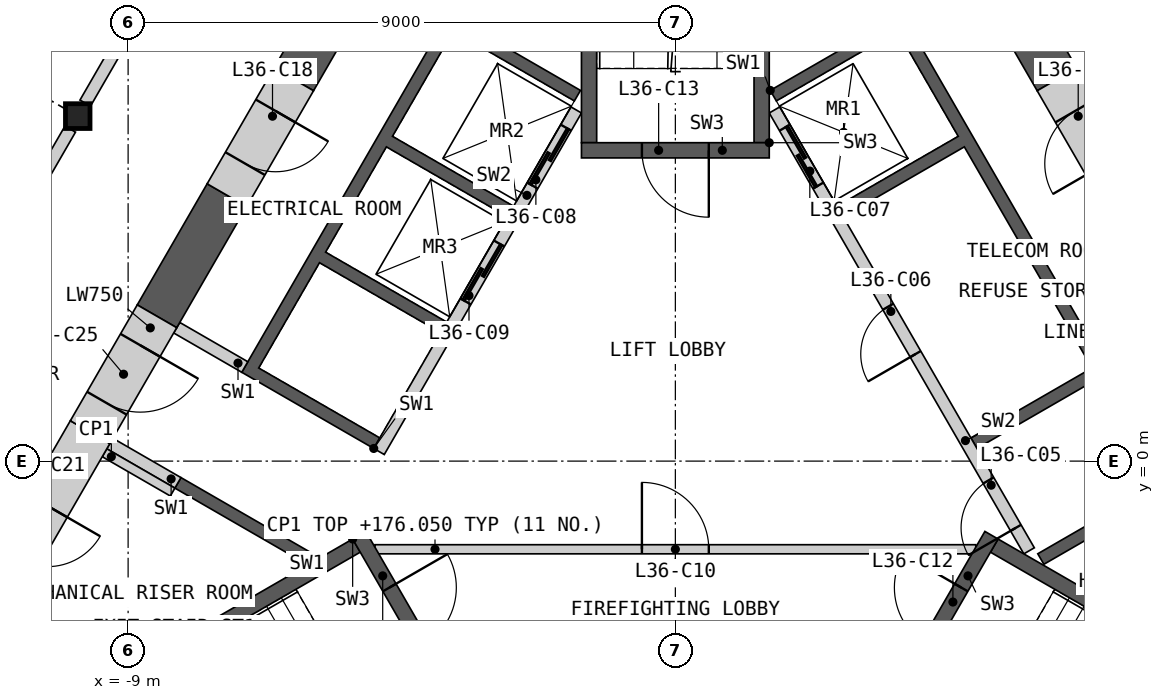
"""IFC4 building model, lengths in metres.
Left out: names, types, materials, properties, quantities, classifications, styles, units other than length and angle.
Written with IfcOpenShell. Run it as: python <this file> out.ifc"""

import sys

from ifc_helpers import new_model, si_unit, direction, frame, frame_2d, origin, origin_2d, place, context, subcontext, project, spatial, polyline, rectangle, i_section, outline, extrude, element, fill, save


model = new_model("IFC4")
c1 = context("Model", 3, precision=1e-05, world=origin(), true_north=direction((0.0, 1.0)))
c2 = subcontext(c1, "Body", "Model", "MODEL_VIEW")
j1 = project(units=[si_unit("LENGTHUNIT", "METRE"), si_unit("PLANEANGLEUNIT", "RADIAN")], contexts=[c1])
p1 = place(None, origin())
s1 = spatial("IfcSite", under=j1, at=p1, CompositionType="ELEMENT")
p2 = place(p1, origin())
s2 = spatial("IfcBuilding", under=s1, at=p2, CompositionType="ELEMENT")
p3 = place(p2, frame((0.0, 0.0, 172.8)))
s3 = spatial("IfcBuildingStorey", under=s2, at=p3, CompositionType="ELEMENT", Elevation=172.8)
p4 = place(p3, frame((-9.828, 5.675, 0.0), z_axis=(0.0, 0.0, 1.0), x_axis=(1.0, 0.0, 0.0)))
e1 = element("IfcColumn", 1, at=p4, inside=s3, PredefinedType="COLUMN", context=c2, shape_type="SweptSolid", body=[
    extrude(i_section(OverallWidth=0.404, OverallDepth=0.407, WebThickness=0.027, FlangeThickness=0.044, at=origin_2d()), origin(), (0.0, 0.0, 1.0), 3.6),
])
p5 = place(p3, origin())
e2 = element("IfcWall", 2, at=p5, inside=s3, PredefinedType="SHEAR", context=c2, shape_type="SweptSolid", body=[
    extrude(outline(polyline([(1.561, 6.097), (3.731, 7.35), (7.131, 1.461), (4.96, 0.208), (4.861, 0.381), (6.852, 1.531), (4.752, 5.169), (2.76, 4.019), (2.66, 4.192), (4.652, 5.342), (3.652, 7.074), (1.66, 5.924), (1.561, 6.097)])), origin(), (0.0, 0.0, 1.0), 3.25),
])
p6 = place(p3, origin())
e3 = element("IfcWall", 3, at=p6, inside=s3, PredefinedType="SHEAR", context=c2, shape_type="SweptSolid", body=[
    extrude(outline(polyline([(8.231, -0.444), (6.061, -1.697), (5.96, -1.524), (8.131, -0.271), (8.231, -0.444)])), origin(), (0.0, 0.0, 1.0), 3.25),
])
p7 = place(p3, frame((5.817, -1.476, 0.0), z_axis=(0.0, 0.0, 1.0), x_axis=(-0.500002616675, 0.866023893041, 0.0)))
e4 = element("IfcWall", 4, at=p7, inside=s3, PredefinedType="SOLIDWALL", context=c2, shape_type="SweptSolid", body=[
    extrude(rectangle(XDim=8.373, YDim=0.2, at=frame_2d((4.187, 0.0))), origin(), (0.0, 0.0, 1.0), 3.25),
])
p8 = place(p7, frame((0.437, 0.0, 0.0)))
e5 = element("IfcOpeningElement", 5, at=p8, cuts=e4, PredefinedType="OPENING", context=c2, shape_type="SweptSolid", body=[
    extrude(rectangle(XDim=0.9, YDim=2.1, at=frame_2d((0.45, 1.05))), frame((0.0, 0.11, 0.0), z_axis=(0.0, -1.0, 0.0), x_axis=(1.0, 0.0, 0.0)), (0.0, 0.0, 1.0), 0.22),
])
p9 = place(p7, frame((3.737, 0.0, 0.0)))
e6 = element("IfcOpeningElement", 6, at=p9, cuts=e4, PredefinedType="OPENING", context=c2, shape_type="SweptSolid", body=[
    extrude(rectangle(XDim=0.9, YDim=2.1, at=frame_2d((0.45, 1.05))), frame((0.0, 0.11, 0.0), z_axis=(0.0, -1.0, 0.0), x_axis=(1.0, 0.0, 0.0)), (0.0, 0.0, 1.0), 0.22),
])
p10 = place(p7, frame((6.937, 0.0, 0.0)))
e7 = element("IfcOpeningElement", 7, at=p10, cuts=e4, PredefinedType="OPENING", context=c2, shape_type="SweptSolid", body=[
    extrude(rectangle(XDim=1.1, YDim=2.1, at=frame_2d((0.55, 1.05))), frame((0.0, 0.11, 0.0), z_axis=(0.0, -1.0, 0.0), x_axis=(1.0, 0.0, 0.0)), (0.0, 0.0, 1.0), 0.22),
])
p11 = place(p3, origin())
e8 = element("IfcWall", 8, at=p11, inside=s3, PredefinedType="SHEAR", context=c2, shape_type="SweptSolid", body=[
    extrude(outline(polyline([(-6.061, -1.697), (-8.231, -0.444), (-8.131, -0.271), (-5.96, -1.524), (-6.061, -1.697)])), origin(), (0.0, 0.0, 1.0), 3.25),
])
p12 = place(p3, origin())
e9 = element("IfcWall", 9, at=p12, inside=s3, PredefinedType="SHEAR", context=c2, shape_type="SweptSolid", body=[
    extrude(outline(polyline([(-4.96, 0.208), (-7.131, 1.461), (-3.731, 7.35), (-1.561, 6.097), (-1.66, 5.924), (-3.652, 7.074), (-4.652, 5.342), (-2.66, 4.192), (-2.76, 4.019), (-4.752, 5.169), (-5.752, 3.437), (-3.76, 2.287), (-3.861, 2.113), (-5.852, 3.263), (-6.852, 1.531), (-4.861, 0.381), (-4.96, 0.208)])), origin(), (0.0, 0.0, 1.0), 3.25),
])
p13 = place(p3, frame((-1.631, 5.776, 0.0), z_axis=(0.0, 0.0, 1.0), x_axis=(-0.499992876559, -0.866029516466, 0.0)))
e10 = element("IfcWall", 10, at=p13, inside=s3, PredefinedType="SOLIDWALL", context=c2, shape_type="SweptSolid", body=[
    extrude(rectangle(XDim=6.486, YDim=0.2, at=frame_2d((3.243, 0.0))), origin(), (0.0, 0.0, 1.0), 3.25),
])
p14 = place(p13, frame((0.337, 0.0, 0.0)))
e11 = element("IfcOpeningElement", 11, at=p14, cuts=e10, PredefinedType="OPENING", context=c2, shape_type="SweptSolid", body=[
    extrude(rectangle(XDim=1.1, YDim=2.1, at=frame_2d((0.55, 1.05))), frame((0.0, 0.11, 0.0), z_axis=(0.0, -1.0, 0.0), x_axis=(1.0, 0.0, 0.0)), (0.0, 0.0, 1.0), 0.22),
])
p15 = place(p13, frame((2.537, 0.0, 0.0)))
e12 = element("IfcOpeningElement", 12, at=p15, cuts=e10, PredefinedType="OPENING", context=c2, shape_type="SweptSolid", body=[
    extrude(rectangle(XDim=1.1, YDim=2.1, at=frame_2d((0.55, 1.05))), frame((0.0, 0.11, 0.0), z_axis=(0.0, -1.0, 0.0), x_axis=(1.0, 0.0, 0.0)), (0.0, 0.0, 1.0), 0.22),
])
for number, where, z_axis, x_axis in (
    (13, (-7.081, 1.548, 0.0), (0.0, 0.0, 1.0), (-0.866, 0.5, 0.0)),
    (14, (-8.181, -0.357, 0.0), (0.0, 0.0, 1.0), (-0.866, 0.5, 0.0)),
):
    element("IfcWall", number, at=place(p3, frame(where, z_axis=z_axis, x_axis=x_axis)), inside=s3, PredefinedType="SHEAR", context=c2, shape_type="SweptSolid", body=[
        extrude(rectangle(XDim=1.293, YDim=0.2, at=frame_2d((0.646, 0.0))), origin(), (0.0, 0.0, 1.0), 3.25),
    ])
p16 = place(p3, frame((-4.941, -1.45, 0.0), z_axis=(0.0, 0.0, 1.0), x_axis=(1.0, 0.0, 0.0)))
e15 = element("IfcWall", 15, at=p16, inside=s3, PredefinedType="PARTITIONING", context=c2, shape_type="SweptSolid", body=[
    extrude(rectangle(XDim=9.882, YDim=0.15, at=frame_2d((4.941, 0.0))), origin(), (0.0, 0.0, 1.0), 3.25),
])
p17 = place(p16, frame((4.391, 0.0, 0.0)))
e16 = element("IfcOpeningElement", 16, at=p17, cuts=e15, PredefinedType="OPENING", context=c2, shape_type="SweptSolid", body=[
    extrude(rectangle(XDim=1.1, YDim=2.1, at=frame_2d((0.55, 1.05))), frame((0.0, 0.085, 0.0), z_axis=(0.0, -1.0, 0.0), x_axis=(1.0, 0.0, 0.0)), (0.0, 0.0, 1.0), 0.17),
])
p18 = place(p3, origin())
e17 = element("IfcWall", 17, at=p18, inside=s3, PredefinedType="SHEAR", context=c2, shape_type="SweptSolid", body=[
    extrude(outline(polyline([(-5.307, -1.281), (-10.374, -4.206), (-10.032, -4.298), (-5.182, -1.498), (-5.307, -1.281)])), origin(), (0.0, 0.0, 1.0), 3.25),
])
p19 = place(p3, frame((-5.199, -1.219, 0.0), z_axis=(0.0, 0.0, 1.0), x_axis=(0.499982516597, -0.866035497597, 0.0)))
e18 = element("IfcWall", 18, at=p19, inside=s3, PredefinedType="SHEAR", context=c2, shape_type="SweptSolid", body=[
    extrude(rectangle(XDim=3.088, YDim=0.25, at=frame_2d((1.544, 0.0))), origin(), (0.0, 0.0, 1.0), 3.25),
])
p20 = place(p19, frame((0.994, 0.0, 0.0)))
e19 = element("IfcOpeningElement", 19, at=p20, cuts=e18, PredefinedType="OPENING", context=c2, shape_type="SweptSolid", body=[
    extrude(rectangle(XDim=1.1, YDim=2.1, at=frame_2d((0.55, 1.05))), frame((0.0, 0.135, 0.0), z_axis=(0.0, -1.0, 0.0), x_axis=(1.0, 0.0, 0.0)), (0.0, 0.0, 1.0), 0.27),
])
p21 = place(p3, origin())
e20 = element("IfcWall", 20, at=p21, inside=s3, PredefinedType="SHEAR", context=c2, shape_type="SweptSolid", body=[
    extrude(outline(polyline([(10.032, -4.298), (10.374, -4.206), (5.307, -1.281), (5.182, -1.498), (10.032, -4.298)])), origin(), (0.0, 0.0, 1.0), 3.25),
])
p22 = place(p3, frame((3.655, -3.893, 0.0), z_axis=(0.0, 0.0, 1.0), x_axis=(0.499982516597, 0.866035497597, 0.0)))
e21 = element("IfcWall", 21, at=p22, inside=s3, PredefinedType="SHEAR", context=c2, shape_type="SweptSolid", body=[
    extrude(rectangle(XDim=3.088, YDim=0.25, at=frame_2d((1.544, 0.0))), origin(), (0.0, 0.0, 1.0), 3.25),
])
p23 = place(p22, frame((0.994, 0.0, 0.0)))
e22 = element("IfcOpeningElement", 22, at=p23, cuts=e21, PredefinedType="OPENING", context=c2, shape_type="SweptSolid", body=[
    extrude(rectangle(XDim=1.1, YDim=2.1, at=frame_2d((0.55, 1.05))), frame((0.0, 0.135, 0.0), z_axis=(0.0, -1.0, 0.0), x_axis=(1.0, 0.0, 0.0)), (0.0, 0.0, 1.0), 0.27),
])
p24 = place(p3, origin())
e23 = element("IfcWall", 23, at=p24, inside=s3, PredefinedType="SHEAR", context=c2, shape_type="SweptSolid", body=[
    extrude(outline(polyline([(1.544, 5.237), (1.544, 11.087), (1.294, 10.837), (1.294, 5.237), (1.544, 5.237)])), origin(), (0.0, 0.0, 1.0), 3.25),
])
p25 = place(p3, origin())
e24 = element("IfcWall", 24, at=p25, inside=s3, PredefinedType="SHEAR", context=c2, shape_type="SweptSolid", body=[
    extrude(outline(polyline([(-1.294, 10.837), (-1.544, 11.087), (-1.544, 5.237), (-1.294, 5.237), (-1.294, 10.837)])), origin(), (0.0, 0.0, 1.0), 3.25),
])
p26 = place(p3, frame((1.544, 5.112, 0.0), z_axis=(0.0, 0.0, 1.0), x_axis=(-1.0, 0.0, 0.0)))
e25 = element("IfcWall", 25, at=p26, inside=s3, PredefinedType="SHEAR", context=c2, shape_type="SweptSolid", body=[
    extrude(rectangle(XDim=3.088, YDim=0.25, at=frame_2d((1.544, 0.0))), origin(), (0.0, 0.0, 1.0), 3.25),
])
p27 = place(p26, frame((0.994, 0.0, 0.0)))
e26 = element("IfcOpeningElement", 26, at=p27, cuts=e25, PredefinedType="OPENING", context=c2, shape_type="SweptSolid", body=[
    extrude(rectangle(XDim=1.1, YDim=2.1, at=frame_2d((0.55, 1.05))), frame((0.0, 0.135, 0.0), z_axis=(0.0, -1.0, 0.0), x_axis=(1.0, 0.0, 0.0)), (0.0, 0.0, 1.0), 0.27),
])
p28 = place(p3, frame((-8.268, -0.509, 0.0), z_axis=(0.0, 0.0, 1.0), x_axis=(-0.866003189247, 0.500038474733, 0.0)))
e27 = element("IfcWall", 27, at=p28, inside=s3, PredefinedType="PARTITIONING", context=c2, shape_type="SweptSolid", body=[
    extrude(rectangle(XDim=1.293, YDim=0.15, at=frame_2d((0.646, 0.0))), origin(), (0.0, 0.0, 1.0), 3.25),
])
for number, where, z_axis, x_axis in (
    (28, (6.275, 6.279, 0.0), (0.0, 0.0, 1.0), (-0.5, 0.866, 0.0)),
    (29, (-4.817, 8.804, 0.0), (0.0, 0.0, 1.0), (-0.5, -0.866, 0.0)),
):
    element("IfcWall", number, at=place(p3, frame(where, z_axis=z_axis, x_axis=x_axis)), inside=s3, PredefinedType="SHEAR", context=c2, shape_type="SweptSolid", body=[
        extrude(rectangle(XDim=2.916, YDim=0.75, at=frame_2d((1.458, 0.0))), origin(), (0.0, 0.0, 1.0), 3.25),
    ])
p29 = place(p3, frame((-7.375, 4.374, 0.0), z_axis=(0.0, 0.0, 1.0), x_axis=(-0.499952165731, -0.866053019151, 0.0)))
e30 = element("IfcWall", 30, at=p29, inside=s3, PredefinedType="SHEAR", context=c2, shape_type="SweptSolid", body=[
    extrude(rectangle(XDim=2.3, YDim=0.75, at=frame_2d((1.15, 0.0))), origin(), (0.0, 0.0, 1.0), 3.25),
])
p30 = place(p3, frame((-6.275, 6.279, 0.0), z_axis=(0.0, 0.0, 1.0), x_axis=(-0.499946605688, -0.86605622881, 0.0)))
e31 = element("IfcWall", 31, at=p30, inside=s3, PredefinedType="SHEAR", context=c2, shape_type="SweptSolid", body=[
    extrude(rectangle(XDim=2.2, YDim=0.75, at=frame_2d((1.1, 0.0))), origin(), (0.0, 0.0, 1.0), 3.25),
])
p31 = place(p30, frame((0.6, 0.0, 0.0)))
e32 = element("IfcOpeningElement", 32, at=p31, cuts=e31, PredefinedType="OPENING", context=c2, shape_type="SweptSolid", body=[
    extrude(rectangle(XDim=1.0, YDim=2.1, at=frame_2d((0.5, 1.05))), frame((0.0, 0.385, 0.0), z_axis=(0.0, -1.0, 0.0), x_axis=(1.0, 0.0, 0.0)), (0.0, 0.0, 1.0), 0.77),
])
p32 = place(p3, frame((7.375, 4.374, 0.0), z_axis=(0.0, 0.0, 1.0), x_axis=(-0.499946605688, 0.86605622881, 0.0)))
e33 = element("IfcWall", 33, at=p32, inside=s3, PredefinedType="SHEAR", context=c2, shape_type="SweptSolid", body=[
    extrude(rectangle(XDim=2.2, YDim=0.75, at=frame_2d((1.1, 0.0))), origin(), (0.0, 0.0, 1.0), 3.25),
])
p33 = place(p32, frame((0.6, 0.0, 0.0)))
e34 = element("IfcOpeningElement", 34, at=p33, cuts=e33, PredefinedType="OPENING", context=c2, shape_type="SweptSolid", body=[
    extrude(rectangle(XDim=1.0, YDim=2.1, at=frame_2d((0.5, 1.05))), frame((0.0, 0.385, 0.0), z_axis=(0.0, -1.0, 0.0), x_axis=(1.0, 0.0, 0.0)), (0.0, 0.0, 1.0), 0.77),
])
p34 = place(p3, frame((-9.625, 0.477, 0.0), z_axis=(0.0, 0.0, 1.0), x_axis=(-0.499995718215, -0.86602787586, 0.0)))
e35 = element("IfcWall", 35, at=p34, inside=s3, PredefinedType="SHEAR", context=c2, shape_type="SweptSolid", body=[
    extrude(rectangle(XDim=3.016, YDim=0.75, at=frame_2d((1.508, 0.0))), origin(), (0.0, 0.0, 1.0), 3.25),
])
p35 = place(p34, frame((1.4, 0.0, 0.0)))
e36 = element("IfcOpeningElement", 36, at=p35, cuts=e35, PredefinedType="OPENING", context=c2, shape_type="SweptSolid", body=[
    extrude(rectangle(XDim=1.0, YDim=2.1, at=frame_2d((0.5, 1.05))), frame((0.0, 0.385, 0.0), z_axis=(0.0, -1.0, 0.0), x_axis=(1.0, 0.0, 0.0)), (0.0, 0.0, 1.0), 0.77),
])
p36 = place(p3, frame((-8.525, 2.382, 0.0), z_axis=(0.0, 0.0, 1.0), x_axis=(-0.500077893725, -0.86598042715, 0.0)))
e37 = element("IfcWall", 37, at=p36, inside=s3, PredefinedType="SHEAR", context=c2, shape_type="SweptSolid", body=[
    extrude(rectangle(XDim=2.2, YDim=0.75, at=frame_2d((1.1, 0.0))), origin(), (0.0, 0.0, 1.0), 3.25),
])
p37 = place(p36, frame((0.55, 0.0, 0.0)))
e38 = element("IfcOpeningElement", 38, at=p37, cuts=e37, PredefinedType="OPENING", context=c2, shape_type="SweptSolid", body=[
    extrude(rectangle(XDim=1.1, YDim=2.1, at=frame_2d((0.55, 1.05))), frame((0.0, 0.385, 0.0), z_axis=(0.0, -1.0, 0.0), x_axis=(1.0, 0.0, 0.0)), (0.0, 0.0, 1.0), 0.77),
])
p38 = place(p3, frame((5.038, 13.972, 0.0), z_axis=(0.0, 0.0, 1.0), x_axis=(0.50000393355, -0.866023132736, 0.0)))
e39 = element("IfcWall", 39, at=p38, inside=s3, PredefinedType="PARTITIONING", context=c2, shape_type="SweptSolid", body=[
    extrude(rectangle(XDim=9.335, YDim=0.2, at=frame_2d((4.667, 0.0))), origin(), (0.0, 0.0, 1.0), 3.25),
])
p39 = place(p38, frame((1.154, 0.0, 0.0)))
e40 = element("IfcOpeningElement", 40, at=p39, cuts=e39, PredefinedType="OPENING", context=c2, shape_type="SweptSolid", body=[
    extrude(rectangle(XDim=1.1, YDim=2.1, at=frame_2d((0.55, 1.05))), frame((0.0, 0.11, 0.0), z_axis=(0.0, -1.0, 0.0), x_axis=(1.0, 0.0, 0.0)), (0.0, 0.0, 1.0), 0.22),
])
p40 = place(p3, frame((-9.705, 5.888, 0.0), z_axis=(0.0, 0.0, 1.0), x_axis=(0.50000393355, 0.866023132736, 0.0)))
e41 = element("IfcWall", 41, at=p40, inside=s3, PredefinedType="PARTITIONING", context=c2, shape_type="SweptSolid", body=[
    extrude(rectangle(XDim=9.335, YDim=0.2, at=frame_2d((4.667, 0.0))), origin(), (0.0, 0.0, 1.0), 3.25),
])
p41 = place(p40, frame((5.172, 0.0, 0.0)))
e42 = element("IfcOpeningElement", 42, at=p41, cuts=e41, PredefinedType="OPENING", context=c2, shape_type="SweptSolid", body=[
    extrude(rectangle(XDim=1.0, YDim=2.1, at=frame_2d((0.5, 1.05))), frame((0.0, 0.11, 0.0), z_axis=(0.0, -1.0, 0.0), x_axis=(1.0, 0.0, 0.0)), (0.0, 0.0, 1.0), 0.22),
])
p42 = place(p40, frame((1.556, 0.0, 0.0)))
e43 = element("IfcOpeningElement", 43, at=p42, cuts=e41, PredefinedType="OPENING", context=c2, shape_type="SweptSolid", body=[
    extrude(rectangle(XDim=1.8, YDim=2.1, at=frame_2d((0.9, 1.05))), frame((0.0, 0.11, 0.0), z_axis=(0.0, -1.0, 0.0), x_axis=(1.0, 0.0, 0.0)), (0.0, 0.0, 1.0), 0.22),
])
p43 = place(p3, frame((-14.619, -2.624, 0.0), z_axis=(0.0, 0.0, 1.0), x_axis=(0.50000393355, 0.866023132736, 0.0)))
e44 = element("IfcWall", 44, at=p43, inside=s3, PredefinedType="PARTITIONING", context=c2, shape_type="SweptSolid", body=[
    extrude(rectangle(XDim=9.335, YDim=0.2, at=frame_2d((4.667, 0.0))), origin(), (0.0, 0.0, 1.0), 3.25),
])
p44 = place(p43, frame((3.163, 0.0, 0.0)))
e45 = element("IfcOpeningElement", 45, at=p44, cuts=e44, PredefinedType="OPENING", context=c2, shape_type="SweptSolid", body=[
    extrude(rectangle(XDim=1.0, YDim=2.1, at=frame_2d((0.5, 1.05))), frame((0.0, 0.11, 0.0), z_axis=(0.0, -1.0, 0.0), x_axis=(1.0, 0.0, 0.0)), (0.0, 0.0, 1.0), 0.22),
])
p45 = place(p8, origin())
e46 = element("IfcDoor", 46, at=p45, inside=s3, OperationType="SINGLE_SWING_LEFT", PredefinedType="DOOR", context=c2, shape_type="SweptSolid", body=[
    extrude(rectangle(XDim=0.9, YDim=2.1, at=frame_2d((0.45, 1.05))), frame((0.0, 0.025, 0.0), z_axis=(0.0, -1.0, 0.0), x_axis=(1.0, 0.0, 0.0)), (0.0, 0.0, 1.0), 0.05),
])
fill(e5, e46)
p46 = place(p9, origin())
e47 = element("IfcDoor", 47, at=p46, inside=s3, OperationType="SINGLE_SWING_LEFT", PredefinedType="DOOR", context=c2, shape_type="SweptSolid", body=[
    extrude(rectangle(XDim=0.9, YDim=2.1, at=frame_2d((0.45, 1.05))), frame((0.0, 0.025, 0.0), z_axis=(0.0, -1.0, 0.0), x_axis=(1.0, 0.0, 0.0)), (0.0, 0.0, 1.0), 0.05),
])
fill(e6, e47)
p47 = place(p10, origin())
e48 = element("IfcDoor", 48, at=p47, inside=s3, OperationType="SLIDING_TO_LEFT", PredefinedType="DOOR", context=c2, shape_type="SweptSolid", body=[
    extrude(rectangle(XDim=1.1, YDim=2.1, at=frame_2d((0.55, 1.05))), frame((0.0, 0.025, 0.0), z_axis=(0.0, -1.0, 0.0), x_axis=(1.0, 0.0, 0.0)), (0.0, 0.0, 1.0), 0.05),
])
fill(e7, e48)
p48 = place(p14, origin())
e49 = element("IfcDoor", 49, at=p48, inside=s3, OperationType="SLIDING_TO_LEFT", PredefinedType="DOOR", context=c2, shape_type="SweptSolid", body=[
    extrude(rectangle(XDim=1.1, YDim=2.1, at=frame_2d((0.55, 1.05))), frame((0.0, 0.025, 0.0), z_axis=(0.0, -1.0, 0.0), x_axis=(1.0, 0.0, 0.0)), (0.0, 0.0, 1.0), 0.05),
])
fill(e11, e49)
p49 = place(p15, origin())
e50 = element("IfcDoor", 50, at=p49, inside=s3, OperationType="SLIDING_TO_LEFT", PredefinedType="DOOR", context=c2, shape_type="SweptSolid", body=[
    extrude(rectangle(XDim=1.1, YDim=2.1, at=frame_2d((0.55, 1.05))), frame((0.0, 0.025, 0.0), z_axis=(0.0, -1.0, 0.0), x_axis=(1.0, 0.0, 0.0)), (0.0, 0.0, 1.0), 0.05),
])
fill(e12, e50)
p50 = place(p17, origin())
e51 = element("IfcDoor", 51, at=p50, inside=s3, OperationType="SINGLE_SWING_LEFT", PredefinedType="DOOR", context=c2, shape_type="SweptSolid", body=[
    extrude(rectangle(XDim=1.1, YDim=2.1, at=frame_2d((0.55, 1.05))), frame((0.0, 0.025, 0.0), z_axis=(0.0, -1.0, 0.0), x_axis=(1.0, 0.0, 0.0)), (0.0, 0.0, 1.0), 0.05),
])
fill(e16, e51)
p51 = place(p20, origin())
e52 = element("IfcDoor", 52, at=p51, inside=s3, OperationType="SINGLE_SWING_LEFT", PredefinedType="DOOR", context=c2, shape_type="SweptSolid", body=[
    extrude(rectangle(XDim=1.1, YDim=2.1, at=frame_2d((0.55, 1.05))), frame((0.0, 0.025, 0.0), z_axis=(0.0, -1.0, 0.0), x_axis=(1.0, 0.0, 0.0)), (0.0, 0.0, 1.0), 0.05),
])
fill(e19, e52)
p52 = place(p23, origin())
e53 = element("IfcDoor", 53, at=p52, inside=s3, OperationType="SINGLE_SWING_RIGHT", PredefinedType="DOOR", context=c2, shape_type="SweptSolid", body=[
    extrude(rectangle(XDim=1.1, YDim=2.1, at=frame_2d((0.55, 1.05))), frame((0.0, 0.025, 0.0), z_axis=(0.0, -1.0, 0.0), x_axis=(1.0, 0.0, 0.0)), (0.0, 0.0, 1.0), 0.05),
])
fill(e22, e53)
p53 = place(p27, origin())
e54 = element("IfcDoor", 54, at=p53, inside=s3, OperationType="SINGLE_SWING_LEFT", PredefinedType="DOOR", context=c2, shape_type="SweptSolid", body=[
    extrude(rectangle(XDim=1.1, YDim=2.1, at=frame_2d((0.55, 1.05))), frame((0.0, 0.025, 0.0), z_axis=(0.0, -1.0, 0.0), x_axis=(1.0, 0.0, 0.0)), (0.0, 0.0, 1.0), 0.05),
])
fill(e26, e54)
p54 = place(p31, origin())
e55 = element("IfcDoor", 55, at=p54, inside=s3, OperationType="SINGLE_SWING_LEFT", PredefinedType="DOOR", context=c2, shape_type="SweptSolid", body=[
    extrude(rectangle(XDim=1.0, YDim=2.1, at=frame_2d((0.5, 1.05))), frame((0.0, 0.13, 0.0), z_axis=(0.0, -1.0, 0.0), x_axis=(1.0, 0.0, 0.0)), (0.0, 0.0, 1.0), 0.05),
])
fill(e32, e55)
p55 = place(p33, origin())
e56 = element("IfcDoor", 56, at=p55, inside=s3, OperationType="SINGLE_SWING_LEFT", PredefinedType="DOOR", context=c2, shape_type="SweptSolid", body=[
    extrude(rectangle(XDim=1.0, YDim=2.1, at=frame_2d((0.5, 1.05))), frame((0.0, 0.13, 0.0), z_axis=(0.0, -1.0, 0.0), x_axis=(1.0, 0.0, 0.0)), (0.0, 0.0, 1.0), 0.05),
])
fill(e34, e56)
p56 = place(p35, origin())
e57 = element("IfcDoor", 57, at=p56, inside=s3, OperationType="SINGLE_SWING_LEFT", PredefinedType="DOOR", context=c2, shape_type="SweptSolid", body=[
    extrude(rectangle(XDim=1.0, YDim=2.1, at=frame_2d((0.5, 1.05))), frame((0.0, 0.13, 0.0), z_axis=(0.0, -1.0, 0.0), x_axis=(1.0, 0.0, 0.0)), (0.0, 0.0, 1.0), 0.05),
])
fill(e36, e57)
p57 = place(p37, origin())
e58 = element("IfcDoor", 58, at=p57, inside=s3, OperationType="SINGLE_SWING_LEFT", PredefinedType="DOOR", context=c2, shape_type="SweptSolid", body=[
    extrude(rectangle(XDim=1.1, YDim=2.1, at=frame_2d((0.55, 1.05))), frame((0.0, 0.13, 0.0), z_axis=(0.0, -1.0, 0.0), x_axis=(1.0, 0.0, 0.0)), (0.0, 0.0, 1.0), 0.05),
])
fill(e38, e58)
save(model, sys.argv[1])
